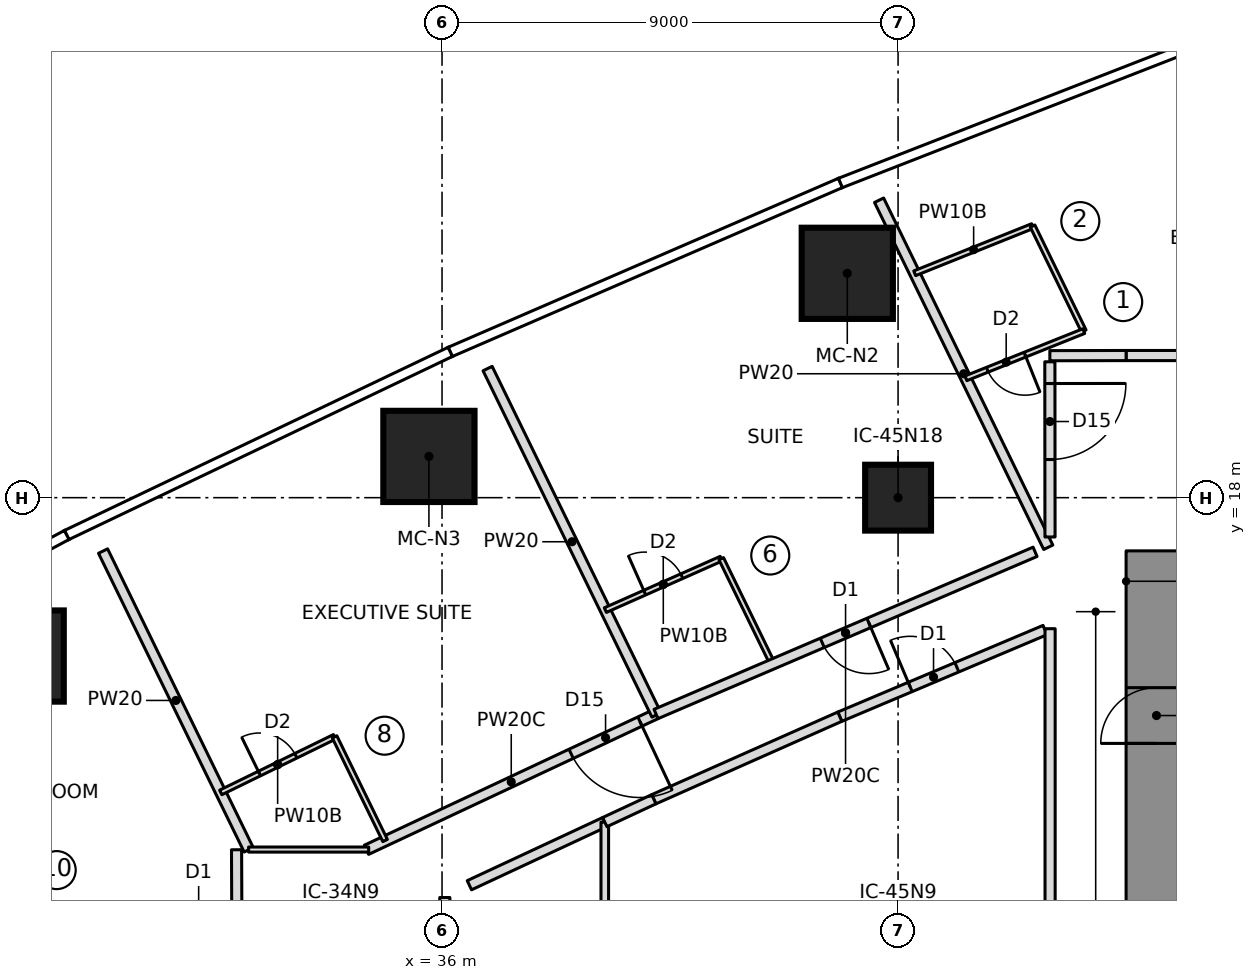
"""IFC4 building model, lengths in metres.
Left out: names, types, materials, properties, quantities, classifications, styles, units other than length and angle.
Written with IfcOpenShell. Run it as: python <this file> out.ifc"""

import sys

from ifc_helpers import new_model, si_unit, direction, frame, frame_2d, origin, origin_2d, place, context, subcontext, project, spatial, rectangle, extrude, element, fill, save


model = new_model("IFC4")
c1 = context("Model", 3, precision=1e-05, world=origin(), true_north=direction((0.0, 1.0)))
c2 = subcontext(c1, "Body", "Model", "MODEL_VIEW")
j1 = project(units=[si_unit("LENGTHUNIT", "METRE"), si_unit("PLANEANGLEUNIT", "RADIAN")], contexts=[c1])
p1 = place(None, origin())
s1 = spatial("IfcSite", under=j1, at=p1, CompositionType="ELEMENT")
p2 = place(p1, origin())
s2 = spatial("IfcBuilding", under=s1, at=p2, CompositionType="ELEMENT")
p3 = place(p2, frame((0.0, 0.0, 50.25)))
s3 = spatial("IfcBuildingStorey", under=s2, at=p3, CompositionType="ELEMENT", Elevation=50.25)
p4 = place(p3, frame((50.1, 6.65, 0.0), z_axis=(0.0, 0.0, 1.0), x_axis=(0.0, 1.0, 0.0)))
e1 = element("IfcWall", 1, at=p4, inside=s3, PredefinedType="SHEAR", context=c2, shape_type="SweptSolid", body=[
    extrude(rectangle(XDim=10.3, YDim=1.2, at=frame_2d((5.15, 0.0))), origin(), (0.0, 0.0, 1.0), 3.55),
])
p5 = place(p4, frame((6.5, 0.0, 0.0)))
e2 = element("IfcOpeningElement", 2, at=p5, cuts=e1, PredefinedType="OPENING", context=c2, shape_type="SweptSolid", body=[
    extrude(rectangle(XDim=1.1, YDim=2.1, at=frame_2d((0.55, 1.05))), frame((0.0, 0.61, 0.0), z_axis=(0.0, -1.0, 0.0), x_axis=(1.0, 0.0, 0.0)), (0.0, 0.0, 1.0), 1.22),
])
for number, where, z_axis, x_axis in (
    (3, (43.998, 22.428, 0.0), (0.0, 0.0, 1.0), (1.0, 0.0, 0.0)),
    (4, (35.741, 18.814, 0.0), (0.0, 0.0, 1.0), (1.0, 0.0, 0.0)),
    (5, (27.635, 14.874, 0.0), (0.0, 0.0, 1.0), (1.0, 0.0, 0.0)),
):
    element("IfcColumn", number, at=place(p3, frame(where, z_axis=z_axis, x_axis=x_axis)), inside=s3, PredefinedType="COLUMN", context=c2, shape_type="SweptSolid", body=[
        extrude(rectangle(XDim=1.8, YDim=1.8, at=origin_2d()), origin(), (0.0, 0.0, 1.0), 3.55),
    ])
p6 = place(p3, frame((45.0, 18.0, 0.0), z_axis=(0.0, 0.0, 1.0), x_axis=(1.0, 0.0, 0.0)))
e6 = element("IfcColumn", 6, at=p6, inside=s3, PredefinedType="COLUMN", context=c2, shape_type="SweptSolid", body=[
    extrude(rectangle(XDim=1.3, YDim=1.3, at=origin_2d()), origin(), (0.0, 0.0, 1.0), 3.55),
])
p7 = place(p3, frame((32.185, 11.05, 0.0), z_axis=(0.0, 0.0, 1.0), x_axis=(-0.438228560869, 0.898863576099, 0.0)))
e7 = element("IfcWall", 7, at=p7, inside=s3, PredefinedType="PARTITIONING", context=c2, shape_type="SweptSolid", body=[
    extrude(rectangle(XDim=6.559, YDim=0.2, at=frame_2d((3.28, 0.0))), origin(), (0.0, 0.0, 1.0), 3.25),
])
p8 = place(p3, frame((40.223, 13.73, 0.0), z_axis=(0.0, 0.0, 1.0), x_axis=(-0.905363217407, -0.424638015923, 0.0)))
e8 = element("IfcWall", 8, at=p8, inside=s3, PredefinedType="PARTITIONING", context=c2, shape_type="SweptSolid", body=[
    extrude(rectangle(XDim=6.312, YDim=0.2, at=frame_2d((3.156, 0.0))), origin(), (0.0, 0.0, 1.0), 3.25),
])
p9 = place(p8, frame((0.35, 0.0, 0.0)))
e9 = element("IfcOpeningElement", 9, at=p9, cuts=e8, PredefinedType="OPENING", context=c2, shape_type="SweptSolid", body=[
    extrude(rectangle(XDim=1.5, YDim=2.1, at=frame_2d((0.75, 1.05))), frame((0.0, 0.11, 0.0), z_axis=(0.0, -1.0, 0.0), x_axis=(1.0, 0.0, 0.0)), (0.0, 0.0, 1.0), 0.22),
])
p10 = place(p3, frame((31.633, 12.182, 0.0), z_axis=(0.0, 0.0, 1.0), x_axis=(0.89845285455, 0.439070003702, 0.0)))
e10 = element("IfcWall", 10, at=p10, inside=s3, PredefinedType="PARTITIONING", context=c2, shape_type="SweptSolid", body=[
    extrude(rectangle(XDim=2.5, YDim=0.1, at=frame_2d((1.25, 0.0))), origin(), (0.0, 0.0, 1.0), 3.25),
])
p11 = place(p10, frame((0.85, 0.0, 0.0)))
e11 = element("IfcOpeningElement", 11, at=p11, cuts=e10, PredefinedType="OPENING", context=c2, shape_type="SweptSolid", body=[
    extrude(rectangle(XDim=0.8, YDim=2.1, at=frame_2d((0.4, 1.05))), frame((0.0, 0.06, 0.0), z_axis=(0.0, -1.0, 0.0), x_axis=(1.0, 0.0, 0.0)), (0.0, 0.0, 1.0), 0.12),
])
p12 = place(p3, frame((33.879, 13.28, 0.0), z_axis=(0.0, 0.0, 1.0), x_axis=(0.438227154656, -0.898864261678, 0.0)))
e12 = element("IfcWall", 12, at=p12, inside=s3, PredefinedType="PARTITIONING", context=c2, shape_type="SweptSolid", body=[
    extrude(rectangle(XDim=2.277, YDim=0.1, at=frame_2d((1.138, 0.0))), origin(), (0.0, 0.0, 1.0), 3.25),
])
p13 = place(p3, frame((40.232, 13.712, 0.0), z_axis=(0.0, 0.0, 1.0), x_axis=(-0.438202247191, 0.898876404494, 0.0)))
e13 = element("IfcWall", 13, at=p13, inside=s3, PredefinedType="PARTITIONING", context=c2, shape_type="SweptSolid", body=[
    extrude(rectangle(XDim=7.605, YDim=0.2, at=frame_2d((3.802, 0.0))), origin(), (0.0, 0.0, 1.0), 3.25),
])
p14 = place(p3, frame((39.223, 15.781, 0.0), z_axis=(0.0, 0.0, 1.0), x_axis=(0.914000607553, 0.405712816401, 0.0)))
e14 = element("IfcWall", 14, at=p14, inside=s3, PredefinedType="PARTITIONING", context=c2, shape_type="SweptSolid", body=[
    extrude(rectangle(XDim=2.501, YDim=0.1, at=frame_2d((1.251, 0.0))), origin(), (0.0, 0.0, 1.0), 3.25),
])
p15 = place(p14, frame((0.85, 0.0, 0.0)))
e15 = element("IfcOpeningElement", 15, at=p15, cuts=e14, PredefinedType="OPENING", context=c2, shape_type="SweptSolid", body=[
    extrude(rectangle(XDim=0.8, YDim=2.1, at=frame_2d((0.4, 1.05))), frame((0.0, 0.06, 0.0), z_axis=(0.0, -1.0, 0.0), x_axis=(1.0, 0.0, 0.0)), (0.0, 0.0, 1.0), 0.12),
])
p16 = place(p3, frame((41.51, 16.796, 0.0), z_axis=(0.0, 0.0, 1.0), x_axis=(0.4381470535, -0.898903309321, 0.0)))
e16 = element("IfcWall", 16, at=p16, inside=s3, PredefinedType="PARTITIONING", context=c2, shape_type="SweptSolid", body=[
    extrude(rectangle(XDim=2.278, YDim=0.1, at=frame_2d((1.139, 0.0))), origin(), (0.0, 0.0, 1.0), 3.25),
])
p17 = place(p3, frame((47.964, 17.021, 0.0), z_axis=(0.0, 0.0, 1.0), x_axis=(-0.438207101073, 0.898874038211, 0.0)))
e17 = element("IfcWall", 17, at=p17, inside=s3, PredefinedType="PARTITIONING", context=c2, shape_type="SweptSolid", body=[
    extrude(rectangle(XDim=7.62, YDim=0.2, at=frame_2d((3.81, 0.0))), origin(), (0.0, 0.0, 1.0), 3.25),
])
p18 = place(p3, frame((45.328, 22.428, 0.0), z_axis=(0.0, 0.0, 1.0), x_axis=(0.928288495333, 0.371860819975, 0.0)))
e18 = element("IfcWall", 18, at=p18, inside=s3, PredefinedType="PARTITIONING", context=c2, shape_type="SweptSolid", body=[
    extrude(rectangle(XDim=2.507, YDim=0.1, at=frame_2d((1.253, 0.0))), origin(), (0.0, 0.0, 1.0), 3.25),
])
p19 = place(p3, frame((47.655, 23.361, 0.0), z_axis=(0.0, 0.0, 1.0), x_axis=(0.438171240168, -0.898891519756, 0.0)))
e19 = element("IfcWall", 19, at=p19, inside=s3, PredefinedType="PARTITIONING", context=c2, shape_type="SweptSolid", body=[
    extrude(rectangle(XDim=2.306, YDim=0.1, at=frame_2d((1.153, 0.0))), origin(), (0.0, 0.0, 1.0), 3.25),
])
p20 = place(p3, frame((48.665, 21.288, 0.0), z_axis=(0.0, 0.0, 1.0), x_axis=(-0.928288495333, -0.371860819975, 0.0)))
e20 = element("IfcWall", 20, at=p20, inside=s3, PredefinedType="PARTITIONING", context=c2, shape_type="SweptSolid", body=[
    extrude(rectangle(XDim=2.507, YDim=0.1, at=frame_2d((1.253, 0.0))), origin(), (0.0, 0.0, 1.0), 3.25),
])
p21 = place(p20, frame((1.25, 0.0, 0.0)))
e21 = element("IfcOpeningElement", 21, at=p21, cuts=e20, PredefinedType="OPENING", context=c2, shape_type="SweptSolid", body=[
    extrude(rectangle(XDim=0.8, YDim=2.1, at=frame_2d((0.4, 1.05))), frame((0.0, 0.06, 0.0), z_axis=(0.0, -1.0, 0.0), x_axis=(1.0, 0.0, 0.0)), (0.0, 0.0, 1.0), 0.12),
])
p22 = place(p3, frame((36.54, 10.351, 0.0), z_axis=(0.0, 0.0, 1.0), x_axis=(0.906348100281, 0.422531798943, 0.0)))
e22 = element("IfcWall", 22, at=p22, inside=s3, PredefinedType="PARTITIONING", context=c2, shape_type="SweptSolid", body=[
    extrude(rectangle(XDim=2.948, YDim=0.2, at=frame_2d((1.474, 0.0))), origin(), (0.0, 0.0, 1.0), 3.25),
])
p23 = place(p3, frame((39.212, -11.597, 0.0), z_axis=(0.0, 0.0, 1.0), x_axis=(0.0, 1.0, 0.0)))
e23 = element("IfcWall", 23, at=p23, inside=s3, PredefinedType="PARTITIONING", context=c2, shape_type="SweptSolid", body=[
    extrude(rectangle(XDim=23.193, YDim=0.15, at=frame_2d((11.597, 0.0))), origin(), (0.0, 0.0, 1.0), 3.25),
])
p24 = place(p3, frame((43.85, 13.677, 0.0), z_axis=(0.0, 0.0, 1.0), x_axis=(0.921265924084, 0.388933281068, 0.0)))
e24 = element("IfcWall", 24, at=p24, inside=s3, PredefinedType="PARTITIONING", context=c2, shape_type="SweptSolid", body=[
    extrude(rectangle(XDim=4.396, YDim=0.2, at=frame_2d((2.198, 0.0))), origin(), (0.0, 0.0, 1.0), 3.25),
])
p25 = place(p24, frame((1.508, 0.0, 0.0)))
e25 = element("IfcOpeningElement", 25, at=p25, cuts=e24, PredefinedType="OPENING", context=c2, shape_type="SweptSolid", body=[
    extrude(rectangle(XDim=1.0, YDim=2.1, at=frame_2d((0.5, 1.05))), frame((0.0, 0.11, 0.0), z_axis=(0.0, -1.0, 0.0), x_axis=(1.0, 0.0, 0.0)), (0.0, 0.0, 1.0), 0.22),
])
p26 = place(p3, frame((40.18, 12.048, 0.0), z_axis=(0.0, 0.0, 1.0), x_axis=(0.913986953061, 0.405743576209, 0.0)))
e26 = element("IfcWall", 26, at=p26, inside=s3, PredefinedType="PARTITIONING", context=c2, shape_type="SweptSolid", body=[
    extrude(rectangle(XDim=4.016, YDim=0.2, at=frame_2d((2.008, 0.0))), origin(), (0.0, 0.0, 1.0), 3.25),
])
p27 = place(p3, frame((39.212, 11.597, 0.0), z_axis=(0.0, 0.0, 1.0), x_axis=(0.906346628109, 0.422534956797, 0.0)))
e27 = element("IfcWall", 27, at=p27, inside=s3, PredefinedType="PARTITIONING", context=c2, shape_type="SweptSolid", body=[
    extrude(rectangle(XDim=1.068, YDim=0.2, at=frame_2d((0.534, 0.0))), origin(), (0.0, 0.0, 1.0), 3.25),
])
p28 = place(p3, frame((54.597, 20.805, 0.0), z_axis=(0.0, 0.0, 1.0), x_axis=(-1.0, 0.0, 0.0)))
e28 = element("IfcWall", 28, at=p28, inside=s3, PredefinedType="PARTITIONING", context=c2, shape_type="SweptSolid", body=[
    extrude(rectangle(XDim=5.097, YDim=0.2, at=frame_2d((2.548, 0.0))), origin(), (0.0, 0.0, 1.0), 3.25),
])
p29 = place(p28, frame((2.048, 0.0, 0.0)))
e29 = element("IfcOpeningElement", 29, at=p29, cuts=e28, PredefinedType="OPENING", context=c2, shape_type="SweptSolid", body=[
    extrude(rectangle(XDim=1.5, YDim=2.1, at=frame_2d((0.75, 1.05))), frame((0.0, 0.11, 0.0), z_axis=(0.0, -1.0, 0.0), x_axis=(1.0, 0.0, 0.0)), (0.0, 0.0, 1.0), 0.22),
])
p30 = place(p3, frame((34.553, 11.055, 0.0), z_axis=(0.0, 0.0, 1.0), x_axis=(-1.0, 0.0, 0.0)))
e30 = element("IfcWall", 30, at=p30, inside=s3, PredefinedType="PARTITIONING", context=c2, shape_type="SweptSolid", body=[
    extrude(rectangle(XDim=2.371, YDim=0.1, at=frame_2d((1.186, 0.0))), origin(), (0.0, 0.0, 1.0), 3.25),
])
p31 = place(p3, frame((47.704, 16.931, 0.0), z_axis=(0.0, 0.0, 1.0), x_axis=(-0.919360612497, -0.39341589214, 0.0)))
e31 = element("IfcWall", 31, at=p31, inside=s3, PredefinedType="PARTITIONING", context=c2, shape_type="SweptSolid", body=[
    extrude(rectangle(XDim=8.137, YDim=0.2, at=frame_2d((4.068, 0.0))), origin(), (0.0, 0.0, 1.0), 3.25),
])
p32 = place(p31, frame((3.568, 0.0, 0.0)))
e32 = element("IfcOpeningElement", 32, at=p32, cuts=e31, PredefinedType="OPENING", context=c2, shape_type="SweptSolid", body=[
    extrude(rectangle(XDim=1.0, YDim=2.1, at=frame_2d((0.5, 1.05))), frame((0.0, 0.11, 0.0), z_axis=(0.0, -1.0, 0.0), x_axis=(1.0, 0.0, 0.0)), (0.0, 0.0, 1.0), 0.22),
])
p33 = place(p3, frame((36.053, 6.986, 0.0), z_axis=(0.0, 0.0, 1.0), x_axis=(0.000547345293, 0.999999850207, 0.0)))
e33 = element("IfcWall", 33, at=p33, inside=s3, PredefinedType="PARTITIONING", context=c2, shape_type="SweptSolid", body=[
    extrude(rectangle(XDim=3.122, YDim=0.2, at=frame_2d((1.561, 0.0))), origin(), (0.0, 0.0, 1.0), 3.25),
])
p34 = place(p3, frame((48.0, 15.414, 0.0), z_axis=(0.0, 0.0, 1.0), x_axis=(0.0, -1.0, 0.0)))
e34 = element("IfcWall", 34, at=p34, inside=s3, PredefinedType="PARTITIONING", context=c2, shape_type="SweptSolid", body=[
    extrude(rectangle(XDim=30.828, YDim=0.2, at=frame_2d((15.414, 0.0))), origin(), (0.0, 0.0, 1.0), 3.25),
])
p35 = place(p3, frame((31.945, 11.051, 0.0), z_axis=(0.0, 0.0, 1.0), x_axis=(0.00387969922, -0.999992473939, 0.0)))
e35 = element("IfcWall", 35, at=p35, inside=s3, PredefinedType="PARTITIONING", context=c2, shape_type="SweptSolid", body=[
    extrude(rectangle(XDim=1.259, YDim=0.2, at=frame_2d((0.629, 0.0))), origin(), (0.0, 0.0, 1.0), 3.25),
])
p36 = place(p3, frame((49.5, 20.805, 0.0), z_axis=(0.0, 0.0, 1.0), x_axis=(-0.999998104399, -0.001947099992, 0.0)))
e36 = element("IfcWall", 36, at=p36, inside=s3, PredefinedType="PARTITIONING", context=c2, shape_type="SweptSolid", body=[
    extrude(rectangle(XDim=1.505, YDim=0.2, at=frame_2d((0.752, 0.0))), origin(), (0.0, 0.0, 1.0), 3.25),
])
p37 = place(p3, frame((47.996, 20.682, 0.0), z_axis=(0.0, 0.0, 1.0), x_axis=(0.000847217996, -0.999999641111, 0.0)))
e37 = element("IfcWall", 37, at=p37, inside=s3, PredefinedType="PARTITIONING", context=c2, shape_type="SweptSolid", body=[
    extrude(rectangle(XDim=3.458, YDim=0.2, at=frame_2d((1.729, 0.0))), origin(), (0.0, 0.0, 1.0), 3.25),
])
p38 = place(p37, frame((0.429, 0.0, 0.0)))
e38 = element("IfcOpeningElement", 38, at=p38, cuts=e37, PredefinedType="OPENING", context=c2, shape_type="SweptSolid", body=[
    extrude(rectangle(XDim=1.5, YDim=2.1, at=frame_2d((0.75, 1.05))), frame((0.0, 0.11, 0.0), z_axis=(0.0, -1.0, 0.0), x_axis=(1.0, 0.0, 0.0)), (0.0, 0.0, 1.0), 0.22),
])
p39 = place(p11, origin())
e39 = element("IfcDoor", 39, at=p39, inside=s3, OperationType="SINGLE_SWING_LEFT", PredefinedType="DOOR", context=c2, shape_type="SweptSolid", body=[
    extrude(rectangle(XDim=0.8, YDim=2.1, at=frame_2d((0.4, 1.05))), frame((0.0, 0.025, 0.0), z_axis=(0.0, -1.0, 0.0), x_axis=(1.0, 0.0, 0.0)), (0.0, 0.0, 1.0), 0.05),
])
fill(e11, e39)
p40 = place(p9, origin())
e40 = element("IfcDoor", 40, at=p40, inside=s3, OperationType="DOUBLE_DOOR_SINGLE_SWING", PredefinedType="DOOR", context=c2, shape_type="SweptSolid", body=[
    extrude(rectangle(XDim=1.5, YDim=2.1, at=frame_2d((0.75, 1.05))), frame((0.0, 0.025, 0.0), z_axis=(0.0, -1.0, 0.0), x_axis=(1.0, 0.0, 0.0)), (0.0, 0.0, 1.0), 0.05),
])
fill(e9, e40)
p41 = place(p15, origin())
e41 = element("IfcDoor", 41, at=p41, inside=s3, OperationType="SINGLE_SWING_LEFT", PredefinedType="DOOR", context=c2, shape_type="SweptSolid", body=[
    extrude(rectangle(XDim=0.8, YDim=2.1, at=frame_2d((0.4, 1.05))), frame((0.0, 0.025, 0.0), z_axis=(0.0, -1.0, 0.0), x_axis=(1.0, 0.0, 0.0)), (0.0, 0.0, 1.0), 0.05),
])
fill(e15, e41)
p42 = place(p32, origin())
e42 = element("IfcDoor", 42, at=p42, inside=s3, OperationType="SINGLE_SWING_LEFT", PredefinedType="DOOR", context=c2, shape_type="SweptSolid", body=[
    extrude(rectangle(XDim=1.0, YDim=2.1, at=frame_2d((0.5, 1.05))), frame((0.0, 0.025, 0.0), z_axis=(0.0, -1.0, 0.0), x_axis=(1.0, 0.0, 0.0)), (0.0, 0.0, 1.0), 0.05),
])
fill(e32, e42)
p43 = place(p21, origin())
e43 = element("IfcDoor", 43, at=p43, inside=s3, OperationType="SINGLE_SWING_LEFT", PredefinedType="DOOR", context=c2, shape_type="SweptSolid", body=[
    extrude(rectangle(XDim=0.8, YDim=2.1, at=frame_2d((0.4, 1.05))), frame((0.0, 0.025, 0.0), z_axis=(0.0, -1.0, 0.0), x_axis=(1.0, 0.0, 0.0)), (0.0, 0.0, 1.0), 0.05),
])
fill(e21, e43)
p44 = place(p25, origin())
e44 = element("IfcDoor", 44, at=p44, inside=s3, OperationType="SINGLE_SWING_LEFT", PredefinedType="DOOR", context=c2, shape_type="SweptSolid", body=[
    extrude(rectangle(XDim=1.0, YDim=2.1, at=frame_2d((0.5, 1.05))), frame((0.0, 0.025, 0.0), z_axis=(0.0, -1.0, 0.0), x_axis=(1.0, 0.0, 0.0)), (0.0, 0.0, 1.0), 0.05),
])
fill(e25, e44)
p45 = place(p38, origin())
e45 = element("IfcDoor", 45, at=p45, inside=s3, OperationType="DOUBLE_DOOR_SINGLE_SWING", PredefinedType="DOOR", context=c2, shape_type="SweptSolid", body=[
    extrude(rectangle(XDim=1.5, YDim=2.1, at=frame_2d((0.75, 1.05))), frame((0.0, 0.025, 0.0), z_axis=(0.0, -1.0, 0.0), x_axis=(1.0, 0.0, 0.0)), (0.0, 0.0, 1.0), 0.05),
])
fill(e38, e45)
p46 = place(p5, origin())
e46 = element("IfcDoor", 46, at=p46, inside=s3, OperationType="SINGLE_SWING_RIGHT", PredefinedType="DOOR", context=c2, shape_type="SweptSolid", body=[
    extrude(rectangle(XDim=1.1, YDim=2.1, at=frame_2d((0.55, 1.05))), frame((0.0, 0.025, 0.0), z_axis=(0.0, -1.0, 0.0), x_axis=(1.0, 0.0, 0.0)), (0.0, 0.0, 1.0), 0.05),
])
fill(e2, e46)
save(model, sys.argv[1])
